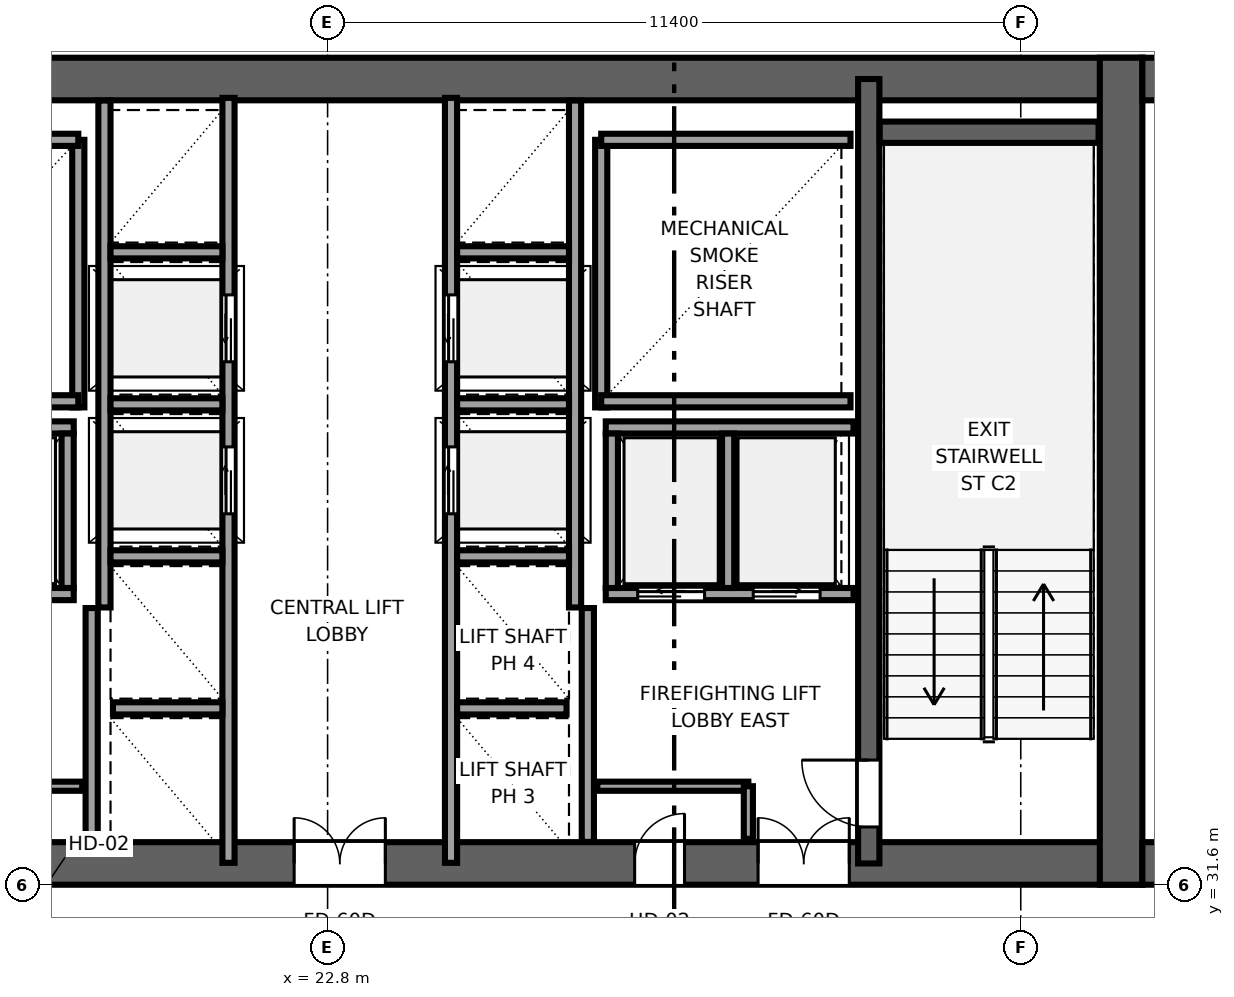
"""IFC4 building model, lengths in metres.
Left out: names, types, materials, properties, quantities, classifications, styles, units other than length and angle.
Written with IfcOpenShell. Run it as: python <this file> out.ifc"""

import sys

from ifc_helpers import new_model, si_unit, direction, frame, frame_2d, origin, place, context, subcontext, project, spatial, rectangle, extrude, source, transform, mapped, element, fill, save


model = new_model("IFC4")
c1 = context("Model", 3, precision=1e-05, world=origin(), true_north=direction((0.0, 1.0)))
c2 = subcontext(c1, "Body", "Model", "MODEL_VIEW")
j1 = project(units=[si_unit("LENGTHUNIT", "METRE"), si_unit("PLANEANGLEUNIT", "RADIAN")], contexts=[c1])
p1 = place(None, origin())
s1 = spatial("IfcSite", under=j1, at=p1, CompositionType="ELEMENT")
p2 = place(p1, origin())
s2 = spatial("IfcBuilding", under=s1, at=p2, CompositionType="ELEMENT")
p3 = place(p2, frame((0.0, 0.0, 147.05)))
s3 = spatial("IfcBuildingStorey", under=s2, at=p3, CompositionType="ELEMENT", Elevation=147.05)
p4 = place(p3, frame((9.8, 31.95, 0.0), z_axis=(0.0, 0.0, 1.0), x_axis=(1.0, 0.0, 0.0)))
e1 = element("IfcWall", 1, at=p4, inside=s3, PredefinedType="SHEAR", context=c2, shape_type="SweptSolid", body=[
    extrude(rectangle(XDim=26.4, YDim=0.7, at=frame_2d((13.2, 0.0))), origin(), (0.0, 0.0, 1.0), 3.55),
])
p5 = place(p4, frame((6.32, 0.0, 0.0), z_axis=(0.0, 0.0, 1.0), x_axis=(-1.0, 0.0, 0.0)))
e2 = element("IfcOpeningElement", 2, at=p5, cuts=e1, PredefinedType="OPENING", context=c2, shape_type="SweptSolid", body=[
    extrude(rectangle(XDim=1.5, YDim=2.04, at=frame_2d((0.75, 1.02))), frame((0.0, 0.36, 0.0), z_axis=(0.0, -1.0, 0.0), x_axis=(1.0, 0.0, 0.0)), (0.0, 0.0, 1.0), 0.72),
])
p6 = place(p4, frame((13.95, 0.0, 0.0), z_axis=(0.0, 0.0, 1.0), x_axis=(-1.0, 0.0, 0.0)))
e3 = element("IfcOpeningElement", 3, at=p6, cuts=e1, PredefinedType="OPENING", context=c2, shape_type="SweptSolid", body=[
    extrude(rectangle(XDim=1.5, YDim=2.04, at=frame_2d((0.75, 1.02))), frame((0.0, 0.36, 0.0), z_axis=(0.0, -1.0, 0.0), x_axis=(1.0, 0.0, 0.0)), (0.0, 0.0, 1.0), 0.72),
])
p7 = place(p4, frame((21.58, 0.0, 0.0), z_axis=(0.0, 0.0, 1.0), x_axis=(-1.0, 0.0, 0.0)))
e4 = element("IfcOpeningElement", 4, at=p7, cuts=e1, PredefinedType="OPENING", context=c2, shape_type="SweptSolid", body=[
    extrude(rectangle(XDim=1.5, YDim=2.04, at=frame_2d((0.75, 1.02))), frame((0.0, 0.36, 0.0), z_axis=(0.0, -1.0, 0.0), x_axis=(1.0, 0.0, 0.0)), (0.0, 0.0, 1.0), 0.72),
])
p8 = place(p4, frame((8.37, 0.0, 0.0), z_axis=(0.0, 0.0, 1.0), x_axis=(-1.0, 0.0, 0.0)))
e5 = element("IfcOpeningElement", 5, at=p8, cuts=e1, PredefinedType="OPENING", context=c2, shape_type="SweptSolid", body=[
    extrude(rectangle(XDim=0.82, YDim=2.01, at=frame_2d((0.41, 1.005))), frame((0.0, 0.36, 0.0), z_axis=(0.0, -1.0, 0.0), x_axis=(1.0, 0.0, 0.0)), (0.0, 0.0, 1.0), 0.72),
])
p9 = place(p4, frame((18.87, 0.0, 0.0), z_axis=(0.0, 0.0, 1.0), x_axis=(-1.0, 0.0, 0.0)))
e6 = element("IfcOpeningElement", 6, at=p9, cuts=e1, PredefinedType="OPENING", context=c2, shape_type="SweptSolid", body=[
    extrude(rectangle(XDim=0.82, YDim=2.01, at=frame_2d((0.41, 1.005))), frame((0.0, 0.36, 0.0), z_axis=(0.0, -1.0, 0.0), x_axis=(1.0, 0.0, 0.0)), (0.0, 0.0, 1.0), 0.72),
])
p10 = place(p3, frame((9.8, 44.85, 0.0), z_axis=(0.0, 0.0, 1.0), x_axis=(1.0, 0.0, 0.0)))
e7 = element("IfcWall", 7, at=p10, inside=s3, PredefinedType="SHEAR", context=c2, shape_type="SweptSolid", body=[
    extrude(rectangle(XDim=26.4, YDim=0.7, at=frame_2d((13.2, 0.0))), origin(), (0.0, 0.0, 1.0), 3.55),
])
p11 = place(p3, frame((35.85, 31.6, 0.0), z_axis=(0.0, 0.0, 1.0), x_axis=(0.0, 1.0, 0.0)))
e8 = element("IfcWall", 8, at=p11, inside=s3, PredefinedType="SHEAR", context=c2, shape_type="SweptSolid", body=[
    extrude(rectangle(XDim=13.6, YDim=0.7, at=frame_2d((6.8, 0.0))), origin(), (0.0, 0.0, 1.0), 3.55),
])
p12 = place(p3, frame((31.7, 31.95, 0.0), z_axis=(0.0, 0.0, 1.0), x_axis=(0.0, 1.0, 0.0)))
e9 = element("IfcWall", 9, at=p12, inside=s3, PredefinedType="SHEAR", context=c2, shape_type="SweptSolid", body=[
    extrude(rectangle(XDim=12.9, YDim=0.35, at=frame_2d((6.45, 0.0))), origin(), (0.0, 0.0, 1.0), 3.55),
])
p13 = place(p12, frame((1.7, 0.0, 0.0), z_axis=(0.0, 0.0, 1.0), x_axis=(-1.0, 0.0, 0.0)))
e10 = element("IfcOpeningElement", 10, at=p13, cuts=e9, PredefinedType="OPENING", context=c2, shape_type="SweptSolid", body=[
    extrude(rectangle(XDim=1.1, YDim=2.12, at=frame_2d((0.55, 1.06))), frame((0.0, 0.185, 0.0), z_axis=(0.0, -1.0, 0.0), x_axis=(1.0, 0.0, 0.0)), (0.0, 0.0, 1.0), 0.37),
])
p14 = place(p3, frame((36.2, 31.95, 0.0), z_axis=(0.0, 0.0, 1.0), x_axis=(1.0, 0.0, 0.0)))
e11 = element("IfcWall", 11, at=p14, inside=s3, PredefinedType="SHEAR", context=c2, shape_type="SweptSolid", body=[
    extrude(rectangle(XDim=4.2, YDim=0.7, at=frame_2d((2.1, 0.0))), origin(), (0.0, 0.0, 1.0), 3.55),
])
p15 = place(p14, frame((1.34, 0.0, 0.0), z_axis=(0.0, 0.0, 1.0), x_axis=(-1.0, 0.0, 0.0)))
e12 = element("IfcOpeningElement", 12, at=p15, cuts=e11, PredefinedType="OPENING", context=c2, shape_type="SweptSolid", body=[
    extrude(rectangle(XDim=1.02, YDim=2.03, at=frame_2d((0.51, 1.015))), frame((0.0, 0.36, 0.0), z_axis=(0.0, -1.0, 0.0), x_axis=(1.0, 0.0, 0.0)), (0.0, 0.0, 1.0), 0.72),
])
p16 = place(p3, frame((36.2, 44.85, 0.0), z_axis=(0.0, 0.0, 1.0), x_axis=(1.0, 0.0, 0.0)))
e13 = element("IfcWall", 13, at=p16, inside=s3, PredefinedType="SHEAR", context=c2, shape_type="SweptSolid", body=[
    extrude(rectangle(XDim=4.2, YDim=0.7, at=frame_2d((2.1, 0.0))), origin(), (0.0, 0.0, 1.0), 3.55),
])
p17 = place(p3, frame((31.88, 43.975, 0.0), z_axis=(0.0, 0.0, 1.0), x_axis=(1.0, 0.0, 0.0)))
e14 = element("IfcWall", 14, at=p17, inside=s3, PredefinedType="SHEAR", context=c2, shape_type="SweptSolid", body=[
    extrude(rectangle(XDim=3.6, YDim=0.35, at=frame_2d((1.8, 0.0))), origin(), (0.0, 0.0, 1.0), 3.55),
])
p18 = place(p3, frame((18.7, 39.45, 0.0), z_axis=(0.0, 0.0, 1.0), x_axis=(0.0, 1.0, 0.0)))
e15 = element("IfcWall", 15, at=p18, inside=s3, PredefinedType="SOLIDWALL", context=c2, shape_type="SweptSolid", body=[
    extrude(rectangle(XDim=4.4, YDim=0.2, at=frame_2d((2.2, 0.0))), origin(), (0.0, 0.0, 1.0), 3.37),
])
for number, where, z_axis, x_axis in (
    (16, (14.6, 39.55, 0.0), (0.0, 0.0, 1.0), (1.0, 0.0, 0.0)),
    (17, (14.6, 43.85, 0.0), (0.0, 0.0, 1.0), (1.0, 0.0, 0.0)),
):
    element("IfcWall", number, at=place(p3, frame(where, z_axis=z_axis, x_axis=x_axis)), inside=s3, PredefinedType="SOLIDWALL", context=c2, shape_type="SweptSolid", body=[
        extrude(rectangle(XDim=4.1, YDim=0.2, at=frame_2d((2.05, 0.0))), origin(), (0.0, 0.0, 1.0), 3.37),
    ])
p19 = place(p3, frame((27.3, 39.45, 0.0), z_axis=(0.0, 0.0, 1.0), x_axis=(0.0, 1.0, 0.0)))
e18 = element("IfcWall", 18, at=p19, inside=s3, PredefinedType="SOLIDWALL", context=c2, shape_type="SweptSolid", body=[
    extrude(rectangle(XDim=4.4, YDim=0.2, at=frame_2d((2.2, 0.0))), origin(), (0.0, 0.0, 1.0), 3.37),
])
for number, where, z_axis, x_axis in (
    (19, (27.3, 39.55, 0.0), (0.0, 0.0, 1.0), (1.0, 0.0, 0.0)),
    (20, (27.3, 43.85, 0.0), (0.0, 0.0, 1.0), (1.0, 0.0, 0.0)),
):
    element("IfcWall", number, at=place(p3, frame(where, z_axis=z_axis, x_axis=x_axis)), inside=s3, PredefinedType="SOLIDWALL", context=c2, shape_type="SweptSolid", body=[
        extrude(rectangle(XDim=4.1, YDim=0.2, at=frame_2d((2.05, 0.0))), origin(), (0.0, 0.0, 1.0), 3.37),
    ])
for number, where, z_axis, x_axis in (
    (21, (18.92, 32.304, 0.0), (0.0, 0.0, 1.0), (0.0, 1.0, 0.0)),
    (22, (27.08, 32.304, 0.0), (0.0, 0.0, 1.0), (0.0, 1.0, 0.0)),
):
    element("IfcWall", number, at=place(p3, frame(where, z_axis=z_axis, x_axis=x_axis)), inside=s3, PredefinedType="SOLIDWALL", context=c2, shape_type="SweptSolid", body=[
        extrude(rectangle(XDim=3.846, YDim=0.2, at=frame_2d((1.923, 0.0))), origin(), (0.0, 0.0, 1.0), 3.37),
    ])
p20 = place(p3, frame((21.17, 31.96, 0.0), z_axis=(0.0, 0.0, 1.0), x_axis=(0.0, 1.0, 0.0)))
e23 = element("IfcWall", 23, at=p20, inside=s3, PredefinedType="SOLIDWALL", context=c2, shape_type="SweptSolid", body=[
    extrude(rectangle(XDim=12.58, YDim=0.2, at=frame_2d((6.29, 0.0))), origin(), (0.0, 0.0, 1.0), 3.37),
])
p21 = place(p20, frame((5.74, 0.0, 0.0)))
e24 = element("IfcOpeningElement", 24, at=p21, cuts=e23, PredefinedType="OPENING", context=c2, shape_type="SweptSolid", body=[
    extrude(rectangle(XDim=1.1, YDim=2.12, at=frame_2d((0.55, 1.06))), frame((0.0, 0.11, 0.0), z_axis=(0.0, -1.0, 0.0), x_axis=(1.0, 0.0, 0.0)), (0.0, 0.0, 1.0), 0.22),
])
p22 = place(p20, frame((8.24, 0.0, 0.0)))
e25 = element("IfcOpeningElement", 25, at=p22, cuts=e23, PredefinedType="OPENING", context=c2, shape_type="SweptSolid", body=[
    extrude(rectangle(XDim=1.1, YDim=2.12, at=frame_2d((0.55, 1.06))), frame((0.0, 0.11, 0.0), z_axis=(0.0, -1.0, 0.0), x_axis=(1.0, 0.0, 0.0)), (0.0, 0.0, 1.0), 0.22),
])
p23 = place(p3, frame((19.13, 36.16, 0.0), z_axis=(0.0, 0.0, 1.0), x_axis=(0.0, 1.0, 0.0)))
e26 = element("IfcWall", 26, at=p23, inside=s3, PredefinedType="SOLIDWALL", context=c2, shape_type="SweptSolid", body=[
    extrude(rectangle(XDim=8.336, YDim=0.2, at=frame_2d((4.168, 0.0))), origin(), (0.0, 0.0, 1.0), 3.37),
])
p24 = place(p3, frame((19.27, 34.5, 0.0), z_axis=(0.0, 0.0, 1.0), x_axis=(1.0, 0.0, 0.0)))
e27 = element("IfcWall", 27, at=p24, inside=s3, PredefinedType="SOLIDWALL", context=c2, shape_type="SweptSolid", body=[
    extrude(rectangle(XDim=1.8, YDim=0.2, at=frame_2d((0.9, 0.0))), origin(), (0.0, 0.0, 1.0), 3.37),
])
for number, where, z_axis, x_axis in (
    (28, (19.23, 37.0, 0.0), (0.0, 0.0, 1.0), (1.0, 0.0, 0.0)),
    (29, (19.23, 39.5, 0.0), (0.0, 0.0, 1.0), (1.0, 0.0, 0.0)),
    (30, (19.23, 42.0, 0.0), (0.0, 0.0, 1.0), (1.0, 0.0, 0.0)),
):
    element("IfcWall", number, at=place(p3, frame(where, z_axis=z_axis, x_axis=x_axis)), inside=s3, PredefinedType="SOLIDWALL", context=c2, shape_type="SweptSolid", body=[
        extrude(rectangle(XDim=1.84, YDim=0.2, at=frame_2d((0.92, 0.0))), origin(), (0.0, 0.0, 1.0), 3.37),
    ])
p25 = place(p3, frame((27.375, 36.38, 0.0), z_axis=(0.0, 0.0, 1.0), x_axis=(1.0, 0.0, 0.0)))
e31 = element("IfcWall", 31, at=p25, inside=s3, PredefinedType="SOLIDWALL", context=c2, shape_type="SweptSolid", body=[
    extrude(rectangle(XDim=4.075, YDim=0.2, at=frame_2d((2.038, 0.0))), origin(), (0.0, 0.0, 1.0), 3.37),
])
p26 = place(p25, frame((0.525, 0.0, 0.0)))
e32 = element("IfcOpeningElement", 32, at=p26, cuts=e31, PredefinedType="OPENING", context=c2, shape_type="SweptSolid", body=[
    extrude(rectangle(XDim=1.1, YDim=2.12, at=frame_2d((0.55, 1.06))), frame((0.0, 0.11, 0.0), z_axis=(0.0, -1.0, 0.0), x_axis=(1.0, 0.0, 0.0)), (0.0, 0.0, 1.0), 0.22),
])
p27 = place(p25, frame((2.425, 0.0, 0.0)))
e33 = element("IfcOpeningElement", 33, at=p27, cuts=e31, PredefinedType="OPENING", context=c2, shape_type="SweptSolid", body=[
    extrude(rectangle(XDim=1.1, YDim=2.12, at=frame_2d((0.55, 1.06))), frame((0.0, 0.11, 0.0), z_axis=(0.0, -1.0, 0.0), x_axis=(1.0, 0.0, 0.0)), (0.0, 0.0, 1.0), 0.22),
])
p28 = place(p3, frame((27.375, 39.12, 0.0), z_axis=(0.0, 0.0, 1.0), x_axis=(1.0, 0.0, 0.0)))
e34 = element("IfcWall", 34, at=p28, inside=s3, PredefinedType="SOLIDWALL", context=c2, shape_type="SweptSolid", body=[
    extrude(rectangle(XDim=4.075, YDim=0.2, at=frame_2d((2.038, 0.0))), origin(), (0.0, 0.0, 1.0), 3.37),
])
for number, where, z_axis, x_axis in (
    (35, (27.475, 36.48, 0.0), (0.0, 0.0, 1.0), (0.0, 1.0, 0.0)),
    (36, (29.387, 36.48, 0.0), (0.0, 0.0, 1.0), (0.0, 1.0, 0.0)),
):
    element("IfcWall", number, at=place(p3, frame(where, z_axis=z_axis, x_axis=x_axis)), inside=s3, PredefinedType="SOLIDWALL", context=c2, shape_type="SweptSolid", body=[
        extrude(rectangle(XDim=2.54, YDim=0.2, at=frame_2d((1.27, 0.0))), origin(), (0.0, 0.0, 1.0), 3.37),
    ])
p29 = place(p3, frame((14.55, 36.38, 0.0), z_axis=(0.0, 0.0, 1.0), x_axis=(1.0, 0.0, 0.0)))
e37 = element("IfcWall", 37, at=p29, inside=s3, PredefinedType="SOLIDWALL", context=c2, shape_type="SweptSolid", body=[
    extrude(rectangle(XDim=4.075, YDim=0.2, at=frame_2d((2.038, 0.0))), origin(), (0.0, 0.0, 1.0), 3.37),
])
p30 = place(p29, frame((0.55, 0.0, 0.0)))
e38 = element("IfcOpeningElement", 38, at=p30, cuts=e37, PredefinedType="OPENING", context=c2, shape_type="SweptSolid", body=[
    extrude(rectangle(XDim=1.1, YDim=2.12, at=frame_2d((0.55, 1.06))), frame((0.0, 0.11, 0.0), z_axis=(0.0, -1.0, 0.0), x_axis=(1.0, 0.0, 0.0)), (0.0, 0.0, 1.0), 0.22),
])
p31 = place(p29, frame((2.45, 0.0, 0.0)))
e39 = element("IfcOpeningElement", 39, at=p31, cuts=e37, PredefinedType="OPENING", context=c2, shape_type="SweptSolid", body=[
    extrude(rectangle(XDim=1.1, YDim=2.12, at=frame_2d((0.55, 1.06))), frame((0.0, 0.11, 0.0), z_axis=(0.0, -1.0, 0.0), x_axis=(1.0, 0.0, 0.0)), (0.0, 0.0, 1.0), 0.22),
])
p32 = place(p3, frame((14.55, 39.12, 0.0), z_axis=(0.0, 0.0, 1.0), x_axis=(1.0, 0.0, 0.0)))
e40 = element("IfcWall", 40, at=p32, inside=s3, PredefinedType="SOLIDWALL", context=c2, shape_type="SweptSolid", body=[
    extrude(rectangle(XDim=4.075, YDim=0.2, at=frame_2d((2.038, 0.0))), origin(), (0.0, 0.0, 1.0), 3.37),
])
p33 = place(p3, frame((18.525, 36.48, 0.0), z_axis=(0.0, 0.0, 1.0), x_axis=(0.0, 1.0, 0.0)))
e41 = element("IfcWall", 41, at=p33, inside=s3, PredefinedType="SOLIDWALL", context=c2, shape_type="SweptSolid", body=[
    extrude(rectangle(XDim=2.54, YDim=0.2, at=frame_2d((1.27, 0.0))), origin(), (0.0, 0.0, 1.0), 3.37),
])
p34 = place(p3, frame((24.83, 31.96, 0.0), z_axis=(0.0, 0.0, 1.0), x_axis=(0.0, 1.0, 0.0)))
e42 = element("IfcWall", 42, at=p34, inside=s3, PredefinedType="SOLIDWALL", context=c2, shape_type="SweptSolid", body=[
    extrude(rectangle(XDim=12.58, YDim=0.2, at=frame_2d((6.29, 0.0))), origin(), (0.0, 0.0, 1.0), 3.37),
])
p35 = place(p34, frame((5.74, 0.0, 0.0)))
e43 = element("IfcOpeningElement", 43, at=p35, cuts=e42, PredefinedType="OPENING", context=c2, shape_type="SweptSolid", body=[
    extrude(rectangle(XDim=1.1, YDim=2.12, at=frame_2d((0.55, 1.06))), frame((0.0, 0.11, 0.0), z_axis=(0.0, -1.0, 0.0), x_axis=(1.0, 0.0, 0.0)), (0.0, 0.0, 1.0), 0.22),
])
p36 = place(p34, frame((8.24, 0.0, 0.0)))
e44 = element("IfcOpeningElement", 44, at=p36, cuts=e42, PredefinedType="OPENING", context=c2, shape_type="SweptSolid", body=[
    extrude(rectangle(XDim=1.1, YDim=2.12, at=frame_2d((0.55, 1.06))), frame((0.0, 0.11, 0.0), z_axis=(0.0, -1.0, 0.0), x_axis=(1.0, 0.0, 0.0)), (0.0, 0.0, 1.0), 0.22),
])
p37 = place(p3, frame((26.87, 36.16, 0.0), z_axis=(0.0, 0.0, 1.0), x_axis=(0.0, 1.0, 0.0)))
e45 = element("IfcWall", 45, at=p37, inside=s3, PredefinedType="SOLIDWALL", context=c2, shape_type="SweptSolid", body=[
    extrude(rectangle(XDim=8.336, YDim=0.2, at=frame_2d((4.168, 0.0))), origin(), (0.0, 0.0, 1.0), 3.37),
])
p38 = place(p3, frame((24.93, 34.5, 0.0), z_axis=(0.0, 0.0, 1.0), x_axis=(1.0, 0.0, 0.0)))
e46 = element("IfcWall", 46, at=p38, inside=s3, PredefinedType="SOLIDWALL", context=c2, shape_type="SweptSolid", body=[
    extrude(rectangle(XDim=1.8, YDim=0.2, at=frame_2d((0.9, 0.0))), origin(), (0.0, 0.0, 1.0), 3.37),
])
for number, where, z_axis, x_axis in (
    (47, (24.93, 37.0, 0.0), (0.0, 0.0, 1.0), (1.0, 0.0, 0.0)),
    (48, (24.93, 39.5, 0.0), (0.0, 0.0, 1.0), (1.0, 0.0, 0.0)),
    (49, (24.93, 42.0, 0.0), (0.0, 0.0, 1.0), (1.0, 0.0, 0.0)),
):
    element("IfcWall", number, at=place(p3, frame(where, z_axis=z_axis, x_axis=x_axis)), inside=s3, PredefinedType="SOLIDWALL", context=c2, shape_type="SweptSolid", body=[
        extrude(rectangle(XDim=1.84, YDim=0.2, at=frame_2d((0.92, 0.0))), origin(), (0.0, 0.0, 1.0), 3.37),
    ])
for number, where, z_axis, x_axis in (
    (50, (16.28, 33.22, 0.0), (0.0, 0.0, 1.0), (1.0, 0.0, 0.0)),
    (51, (27.235, 33.22, 0.0), (0.0, 0.0, 1.0), (1.0, 0.0, 0.0)),
):
    element("IfcWall", number, at=place(p3, frame(where, z_axis=z_axis, x_axis=x_axis)), inside=s3, PredefinedType="PARTITIONING", context=c2, shape_type="SweptSolid", body=[
        extrude(rectangle(XDim=2.485, YDim=0.15, at=frame_2d((1.242, 0.0))), origin(), (0.0, 0.0, 1.0), 3.37),
    ])
p39 = place(p3, frame((29.72, 32.355, 0.0), z_axis=(0.0, 0.0, 1.0), x_axis=(0.0, 1.0, 0.0)))
e52 = element("IfcWall", 52, at=p39, inside=s3, PredefinedType="PARTITIONING", context=c2, shape_type="SweptSolid", body=[
    extrude(rectangle(XDim=0.865, YDim=0.15, at=frame_2d((0.433, 0.0))), origin(), (0.0, 0.0, 1.0), 3.37),
])
m1 = source(origin(), c2, "Body", "SweptSolid", [
    extrude(rectangle(XDim=1.1, YDim=2.12, at=frame_2d((0.55, 1.06))), frame((0.0, 0.025, 0.0), z_axis=(0.0, -1.0, 0.0), x_axis=(1.0, 0.0, 0.0)), (0.0, 0.0, 1.0), 0.05),
])
p40 = place(p13, origin())
e53 = element("IfcDoor", 53, at=p40, inside=s3, OperationType="SINGLE_SWING_RIGHT", PredefinedType="DOOR", context=c2, shape_type="MappedRepresentation", body=[
    mapped(m1, transform((0.0, 0.0, 0.0), x_axis=(1.0, 0.0, 0.0), y_axis=(0.0, 1.0, 0.0), z_axis=(0.0, 0.0, 1.0), scale=1.0)),
])
fill(e10, e53)
m2 = source(origin(), c2, "Body", "SweptSolid", [
    extrude(rectangle(XDim=1.5, YDim=2.04, at=frame_2d((0.75, 1.02))), frame((0.0, 0.025, 0.0), z_axis=(0.0, -1.0, 0.0), x_axis=(1.0, 0.0, 0.0)), (0.0, 0.0, 1.0), 0.05),
])
p41 = place(p6, origin())
e54 = element("IfcDoor", 54, at=p41, inside=s3, OperationType="DOUBLE_DOOR_SINGLE_SWING", PredefinedType="DOOR", context=c2, shape_type="MappedRepresentation", body=[
    mapped(m2, transform((0.0, 0.0, 0.0), x_axis=(1.0, 0.0, 0.0), y_axis=(0.0, 1.0, 0.0), z_axis=(0.0, 0.0, 1.0), scale=1.0)),
])
fill(e3, e54)
p42 = place(p7, origin())
e55 = element("IfcDoor", 55, at=p42, inside=s3, OperationType="DOUBLE_DOOR_SINGLE_SWING", PredefinedType="DOOR", context=c2, shape_type="MappedRepresentation", body=[
    mapped(m2, transform((0.0, 0.0, 0.0), x_axis=(1.0, 0.0, 0.0), y_axis=(0.0, 1.0, 0.0), z_axis=(0.0, 0.0, 1.0), scale=1.0)),
])
fill(e4, e55)
m3 = source(origin(), c2, "Body", "SweptSolid", [
    extrude(rectangle(XDim=0.82, YDim=2.01, at=frame_2d((0.41, 1.005))), frame((0.0, 0.025, 0.0), z_axis=(0.0, -1.0, 0.0), x_axis=(1.0, 0.0, 0.0)), (0.0, 0.0, 1.0), 0.05),
])
p43 = place(p9, origin())
e56 = element("IfcDoor", 56, at=p43, inside=s3, OperationType="SINGLE_SWING_RIGHT", PredefinedType="DOOR", context=c2, shape_type="MappedRepresentation", body=[
    mapped(m3, transform((0.0, 0.0, 0.0), x_axis=(1.0, 0.0, 0.0), y_axis=(0.0, 1.0, 0.0), z_axis=(0.0, 0.0, 1.0), scale=1.0)),
])
fill(e6, e56)
m4 = source(origin(), c2, "Body", "SweptSolid", [
    extrude(rectangle(XDim=1.1, YDim=2.12, at=frame_2d((0.55, 1.06))), frame((0.0, 0.025, 0.0), z_axis=(0.0, -1.0, 0.0), x_axis=(1.0, 0.0, 0.0)), (0.0, 0.0, 1.0), 0.05),
])
p44 = place(p21, origin())
e57 = element("IfcDoor", 57, at=p44, inside=s3, OperationType="SLIDING_TO_RIGHT", PredefinedType="DOOR", context=c2, shape_type="MappedRepresentation", body=[
    mapped(m4, transform((0.0, 0.0, 0.0), x_axis=(1.0, 0.0, 0.0), y_axis=(0.0, 1.0, 0.0), z_axis=(0.0, 0.0, 1.0), scale=1.0)),
])
fill(e24, e57)
p45 = place(p22, origin())
e58 = element("IfcDoor", 58, at=p45, inside=s3, OperationType="SLIDING_TO_LEFT", PredefinedType="DOOR", context=c2, shape_type="MappedRepresentation", body=[
    mapped(m4, transform((0.0, 0.0, 0.0), x_axis=(1.0, 0.0, 0.0), y_axis=(0.0, 1.0, 0.0), z_axis=(0.0, 0.0, 1.0), scale=1.0)),
])
fill(e25, e58)
p46 = place(p26, origin())
e59 = element("IfcDoor", 59, at=p46, inside=s3, OperationType="SLIDING_TO_LEFT", PredefinedType="DOOR", context=c2, shape_type="MappedRepresentation", body=[
    mapped(m4, transform((0.0, 0.0, 0.0), x_axis=(1.0, 0.0, 0.0), y_axis=(0.0, 1.0, 0.0), z_axis=(0.0, 0.0, 1.0), scale=1.0)),
])
fill(e32, e59)
p47 = place(p27, origin())
e60 = element("IfcDoor", 60, at=p47, inside=s3, OperationType="SLIDING_TO_RIGHT", PredefinedType="DOOR", context=c2, shape_type="MappedRepresentation", body=[
    mapped(m4, transform((0.0, 0.0, 0.0), x_axis=(1.0, 0.0, 0.0), y_axis=(0.0, 1.0, 0.0), z_axis=(0.0, 0.0, 1.0), scale=1.0)),
])
fill(e33, e60)
p48 = place(p35, origin())
e61 = element("IfcDoor", 61, at=p48, inside=s3, OperationType="SLIDING_TO_RIGHT", PredefinedType="DOOR", context=c2, shape_type="MappedRepresentation", body=[
    mapped(m4, transform((0.0, 0.0, 0.0), x_axis=(1.0, 0.0, 0.0), y_axis=(0.0, 1.0, 0.0), z_axis=(0.0, 0.0, 1.0), scale=1.0)),
])
fill(e43, e61)
p49 = place(p36, origin())
e62 = element("IfcDoor", 62, at=p49, inside=s3, OperationType="SLIDING_TO_LEFT", PredefinedType="DOOR", context=c2, shape_type="MappedRepresentation", body=[
    mapped(m4, transform((0.0, 0.0, 0.0), x_axis=(1.0, 0.0, 0.0), y_axis=(0.0, 1.0, 0.0), z_axis=(0.0, 0.0, 1.0), scale=1.0)),
])
fill(e44, e62)
save(model, sys.argv[1])
